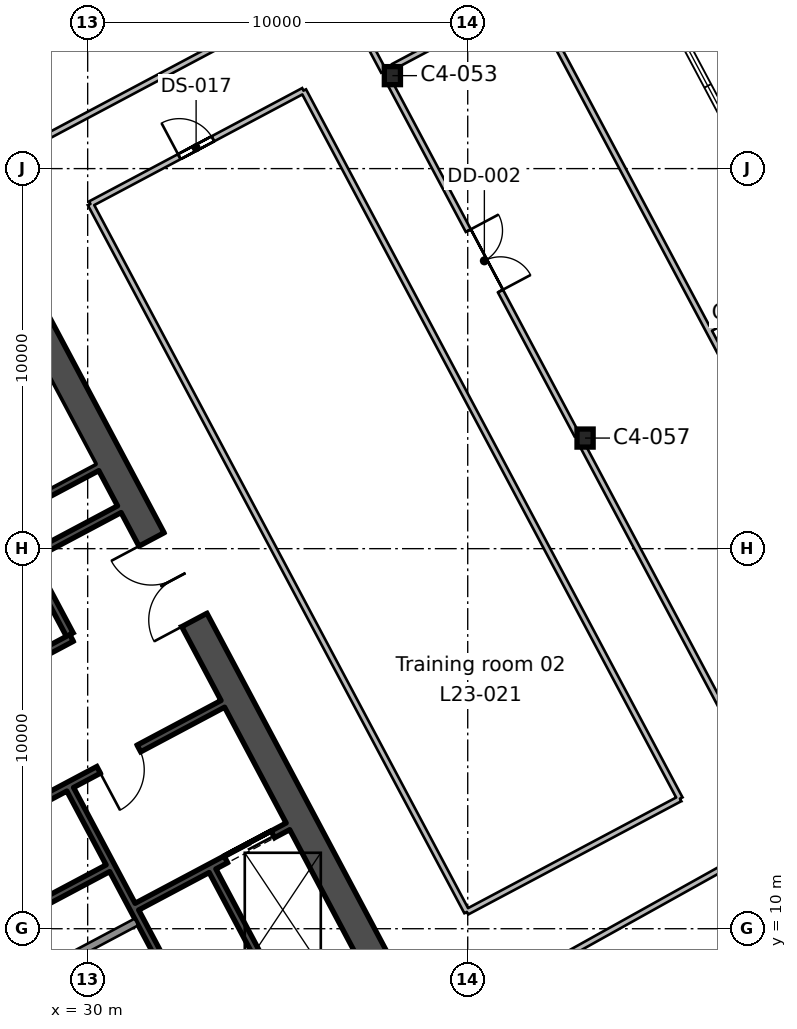
"""IFC4 building model, lengths in metres.
Left out: names, types, materials, properties, quantities, classifications, styles, units other than length and angle.
Written with IfcOpenShell. Run it as: python <this file> out.ifc"""

import sys

from ifc_helpers import new_model, si_unit, direction, frame, frame_2d, origin, origin_2d, place, context, subcontext, project, spatial, rectangle, i_section, extrude, element, fill, save


model = new_model("IFC4")
c1 = context("Model", 3, precision=1e-05, world=origin(), true_north=direction((0.0, 1.0)))
c2 = subcontext(c1, "Body", "Model", "MODEL_VIEW")
j1 = project(units=[si_unit("LENGTHUNIT", "METRE"), si_unit("PLANEANGLEUNIT", "RADIAN")], contexts=[c1])
p1 = place(None, origin())
s1 = spatial("IfcSite", under=j1, at=p1, CompositionType="ELEMENT")
p2 = place(p1, origin())
s2 = spatial("IfcBuilding", under=s1, at=p2, CompositionType="ELEMENT")
p3 = place(p2, frame((0.0, 0.0, 118.2)))
s3 = spatial("IfcBuildingStorey", under=s2, at=p3, CompositionType="ELEMENT", Elevation=118.2)
for number, where, z_axis, x_axis in (
    (1, (43.088, 22.91, 0.0), (0.0, 0.0, 1.0), (1.0, 0.0, 0.0)),
    (2, (38.018, 32.446, 0.0), (0.0, 0.0, 1.0), (1.0, 0.0, 0.0)),
):
    element("IfcColumn", number, at=place(p3, frame(where, z_axis=z_axis, x_axis=x_axis)), inside=s3, PredefinedType="COLUMN", context=c2, shape_type="SweptSolid", body=[
        extrude(i_section(OverallWidth=0.424, OverallDepth=0.475, WebThickness=0.048, FlangeThickness=0.077, FilletRadius=0.015, at=origin_2d()), origin(), (0.0, 0.0, 1.0), 4.0),
    ])
p4 = place(p3, frame((37.713, 8.896, 0.0), z_axis=(0.0, 0.0, 1.0), x_axis=(-0.469469918705, 0.88294846703, 0.0)))
e3 = element("IfcWall", 3, at=p4, inside=s3, PredefinedType="SHEAR", context=c2, shape_type="SweptSolid", body=[
    extrude(rectangle(XDim=19.7, YDim=0.75, at=frame_2d((9.85, 0.0))), origin(), (0.0, 0.0, 1.0), 4.0),
])
p5 = place(p4, frame((10.45, 0.0, 0.0)))
e4 = element("IfcOpeningElement", 4, at=p5, cuts=e3, PredefinedType="OPENING", context=c2, shape_type="SweptSolid", body=[
    extrude(rectangle(XDim=2.4, YDim=2.4, at=frame_2d((1.2, 1.2))), frame((0.0, 0.385, 0.0), z_axis=(0.0, -1.0, 0.0), x_axis=(1.0, 0.0, 0.0)), (0.0, 0.0, 1.0), 0.77),
])
p6 = place(p3, frame((32.968, 7.223, 0.0), z_axis=(0.0, 0.0, 1.0), x_axis=(-0.469480409012, 0.88294288918, 0.0)))
e5 = element("IfcWall", 5, at=p6, inside=s3, PredefinedType="SHEAR", context=c2, shape_type="SweptSolid", body=[
    extrude(rectangle(XDim=7.3, YDim=0.2, at=frame_2d((3.65, 0.0))), origin(), (0.0, 0.0, 1.0), 4.0),
])
p7 = place(p3, frame((29.528, 17.739, 0.0), z_axis=(0.0, 0.0, 1.0), x_axis=(-0.469401318492, 0.882984938828, 0.0)))
e6 = element("IfcWall", 6, at=p7, inside=s3, PredefinedType="SHEAR", context=c2, shape_type="SweptSolid", body=[
    extrude(rectangle(XDim=2.2, YDim=0.2, at=frame_2d((1.1, 0.0))), origin(), (0.0, 0.0, 1.0), 4.0),
])
p8 = place(p3, frame((34.999, 8.303, 0.0), z_axis=(0.0, 0.0, 1.0), x_axis=(-0.4694665462, 0.882950260207, 0.0)))
e7 = element("IfcWall", 7, at=p8, inside=s3, PredefinedType="SHEAR", context=c2, shape_type="SweptSolid", body=[
    extrude(rectangle(XDim=3.65, YDim=0.2, at=frame_2d((1.825, 0.0))), origin(), (0.0, 0.0, 1.0), 4.0),
])
p9 = place(p3, frame((26.692, 7.737, 0.0), z_axis=(0.0, 0.0, 1.0), x_axis=(0.882953967957, 0.469459572775, 0.0)))
e8 = element("IfcWall", 8, at=p9, inside=s3, PredefinedType="SOLIDWALL", context=c2, shape_type="SweptSolid", body=[
    extrude(rectangle(XDim=5.2, YDim=0.2, at=frame_2d((2.6, 0.0))), origin(), (0.0, 0.0, 1.0), 4.0),
])
p10 = place(p3, frame((31.296, 10.581, 0.0), z_axis=(0.0, 0.0, 1.0), x_axis=(0.882960433586, 0.469447412093, 0.0)))
e9 = element("IfcWall", 9, at=p10, inside=s3, PredefinedType="SHEAR", context=c2, shape_type="SweptSolid", body=[
    extrude(rectangle(XDim=4.5, YDim=0.2, at=frame_2d((2.25, 0.0))), origin(), (0.0, 0.0, 1.0), 4.0),
])
p11 = place(p10, frame((2.65, 0.0, 0.0)))
e10 = element("IfcOpeningElement", 10, at=p11, cuts=e9, PredefinedType="OPENING", context=c2, shape_type="SweptSolid", body=[
    extrude(rectangle(XDim=1.4, YDim=2.4, at=frame_2d((0.7, 1.2))), frame((0.0, 0.11, 0.0), z_axis=(0.0, -1.0, 0.0), x_axis=(1.0, 0.0, 0.0)), (0.0, 0.0, 1.0), 0.22),
])
p12 = place(p3, frame((25.941, 9.15, 0.0), z_axis=(0.0, 0.0, 1.0), x_axis=(0.882953967957, 0.469459572775, 0.0)))
e11 = element("IfcWall", 11, at=p12, inside=s3, PredefinedType="SHEAR", context=c2, shape_type="SweptSolid", body=[
    extrude(rectangle(XDim=5.2, YDim=0.2, at=frame_2d((2.6, 0.0))), origin(), (0.0, 0.0, 1.0), 4.0),
])
p13 = place(p3, frame((24.726, 11.222, 0.0), z_axis=(0.0, 0.0, 1.0), x_axis=(0.882940221191, 0.469485426614, 0.0)))
e12 = element("IfcWall", 12, at=p13, inside=s3, PredefinedType="SHEAR", context=c2, shape_type="SweptSolid", body=[
    extrude(rectangle(XDim=10.0, YDim=0.2, at=frame_2d((5.0, 0.0))), origin(), (0.0, 0.0, 1.0), 4.0),
])
p14 = place(p13, frame((6.3, 0.0, 0.0)))
e13 = element("IfcOpeningElement", 13, at=p14, cuts=e12, PredefinedType="OPENING", context=c2, shape_type="SweptSolid", body=[
    extrude(rectangle(XDim=1.2, YDim=2.1, at=frame_2d((0.6, 1.05))), frame((0.0, 0.11, 0.0), z_axis=(0.0, -1.0, 0.0), x_axis=(1.0, 0.0, 0.0)), (0.0, 0.0, 1.0), 0.22),
])
p15 = place(p13, frame((0.36, 0.0, 0.0)))
e14 = element("IfcOpeningElement", 14, at=p15, cuts=e12, PredefinedType="OPENING", context=c2, shape_type="SweptSolid", body=[
    extrude(rectangle(XDim=0.9, YDim=2.1, at=frame_2d((0.45, 1.05))), frame((0.0, 0.11, 0.0), z_axis=(0.0, -1.0, 0.0), x_axis=(1.0, 0.0, 0.0)), (0.0, 0.0, 1.0), 0.22),
])
p16 = place(p13, frame((3.06, 0.0, 0.0)))
e15 = element("IfcOpeningElement", 15, at=p16, cuts=e12, PredefinedType="OPENING", context=c2, shape_type="SweptSolid", body=[
    extrude(rectangle(XDim=0.9, YDim=2.1, at=frame_2d((0.45, 1.05))), frame((0.0, 0.11, 0.0), z_axis=(0.0, -1.0, 0.0), x_axis=(1.0, 0.0, 0.0)), (0.0, 0.0, 1.0), 0.22),
])
p17 = place(p3, frame((24.807, 15.116, 0.0), z_axis=(0.0, 0.0, 1.0), x_axis=(0.882942972946, 0.469480251476, 0.0)))
e16 = element("IfcWall", 16, at=p17, inside=s3, PredefinedType="SHEAR", context=c2, shape_type="SweptSolid", body=[
    extrude(rectangle(XDim=5.4, YDim=0.2, at=frame_2d((2.7, 0.0))), origin(), (0.0, 0.0, 1.0), 4.0),
])
p18 = place(p17, frame((0.8, 0.0, 0.0)))
e17 = element("IfcOpeningElement", 17, at=p18, cuts=e16, PredefinedType="OPENING", context=c2, shape_type="SweptSolid", body=[
    extrude(rectangle(XDim=1.1, YDim=2.1, at=frame_2d((0.55, 1.05))), frame((0.0, 0.11, 0.0), z_axis=(0.0, -1.0, 0.0), x_axis=(1.0, 0.0, 0.0)), (0.0, 0.0, 1.0), 0.22),
])
p19 = place(p17, frame((3.5, 0.0, 0.0)))
e18 = element("IfcOpeningElement", 18, at=p19, cuts=e16, PredefinedType="OPENING", context=c2, shape_type="SweptSolid", body=[
    extrude(rectangle(XDim=1.1, YDim=2.1, at=frame_2d((0.55, 1.05))), frame((0.0, 0.11, 0.0), z_axis=(0.0, -1.0, 0.0), x_axis=(1.0, 0.0, 0.0)), (0.0, 0.0, 1.0), 0.22),
])
p20 = place(p3, frame((23.769, 17.282, 0.0), z_axis=(0.0, 0.0, 1.0), x_axis=(0.882940221191, 0.469485426614, 0.0)))
e19 = element("IfcWall", 19, at=p20, inside=s3, PredefinedType="SHEAR", context=c2, shape_type="SweptSolid", body=[
    extrude(rectangle(XDim=8.0, YDim=0.2, at=frame_2d((4.0, 0.0))), origin(), (0.0, 0.0, 1.0), 4.0),
])
p21 = place(p3, frame((23.182, 18.385, 0.0), z_axis=(0.0, 0.0, 1.0), x_axis=(0.88295287151, 0.469461634952, 0.0)))
e20 = element("IfcWall", 20, at=p21, inside=s3, PredefinedType="SHEAR", context=c2, shape_type="SweptSolid", body=[
    extrude(rectangle(XDim=8.0, YDim=0.2, at=frame_2d((4.0, 0.0))), origin(), (0.0, 0.0, 1.0), 4.0),
])
p22 = place(p3, frame((15.258, 28.499, 0.0), z_axis=(0.0, 0.0, 1.0), x_axis=(0.882941691772, 0.469482660948, 0.0)))
e21 = element("IfcWall", 21, at=p22, inside=s3, PredefinedType="PARTITIONING", context=c2, shape_type="SweptSolid", body=[
    extrude(rectangle(XDim=23.149, YDim=0.15, at=frame_2d((11.574, 0.0))), origin(), (0.0, 0.0, 1.0), 3.64),
])
p23 = place(p3, frame((37.789, 32.557, 0.0), z_axis=(0.0, 0.0, 1.0), x_axis=(-0.469557862383, 0.882901701139, 0.0)))
e22 = element("IfcWall", 22, at=p23, inside=s3, PredefinedType="PARTITIONING", context=c2, shape_type="SweptSolid", body=[
    extrude(rectangle(XDim=2.645, YDim=0.15, at=frame_2d((1.323, 0.0))), origin(), (0.0, 0.0, 1.0), 3.64),
])
p24 = place(p3, frame((36.547, 34.892, 0.0), z_axis=(0.0, 0.0, 1.0), x_axis=(-0.882949665217, -0.469467665226, 0.0)))
e23 = element("IfcWall", 23, at=p24, inside=s3, PredefinedType="PARTITIONING", context=c2, shape_type="SweptSolid", body=[
    extrude(rectangle(XDim=22.432, YDim=0.15, at=frame_2d((11.216, 0.0))), origin(), (0.0, 0.0, 1.0), 3.64),
])
p25 = place(p24, frame((10.35, 0.0, 0.0)))
e24 = element("IfcOpeningElement", 24, at=p25, cuts=e23, PredefinedType="OPENING", context=c2, shape_type="SweptSolid", body=[
    extrude(rectangle(XDim=1.8, YDim=2.1, at=frame_2d((0.9, 1.05))), frame((0.0, 0.085, 0.0), z_axis=(0.0, -1.0, 0.0), x_axis=(1.0, 0.0, 0.0)), (0.0, 0.0, 1.0), 0.17),
])
p26 = place(p3, frame((46.081, 26.226, 0.0), z_axis=(0.0, 0.0, 1.0), x_axis=(-0.469444635522, 0.882961909812, 0.0)))
e25 = element("IfcWall", 25, at=p26, inside=s3, PredefinedType="PARTITIONING", context=c2, shape_type="SweptSolid", body=[
    extrude(rectangle(XDim=9.477, YDim=0.15, at=frame_2d((4.739, 0.0))), origin(), (0.0, 0.0, 1.0), 3.64),
])
p27 = place(p3, frame((41.632, 34.594, 0.0), z_axis=(0.0, 0.0, 1.0), x_axis=(-0.88295491585, -0.469457789984, 0.0)))
e26 = element("IfcWall", 26, at=p27, inside=s3, PredefinedType="PARTITIONING", context=c2, shape_type="SweptSolid", body=[
    extrude(rectangle(XDim=4.07, YDim=0.15, at=frame_2d((2.035, 0.0))), origin(), (0.0, 0.0, 1.0), 3.64),
])
p28 = place(p3, frame((37.973, 32.209, 0.0), z_axis=(0.0, 0.0, 1.0), x_axis=(0.469526119231, -0.88291858252, 0.0)))
e27 = element("IfcWall", 27, at=p28, inside=s3, PredefinedType="PARTITIONING", context=c2, shape_type="SweptSolid", body=[
    extrude(rectangle(XDim=10.443, YDim=0.15, at=frame_2d((5.221, 0.0))), origin(), (0.0, 0.0, 1.0), 3.64),
])
p29 = place(p28, frame((4.35, 0.0, 0.0)))
e28 = element("IfcOpeningElement", 28, at=p29, cuts=e27, PredefinedType="OPENING", context=c2, shape_type="SweptSolid", body=[
    extrude(rectangle(XDim=1.8, YDim=2.1, at=frame_2d((0.9, 1.05))), frame((0.0, 0.085, 0.0), z_axis=(0.0, -1.0, 0.0), x_axis=(1.0, 0.0, 0.0)), (0.0, 0.0, 1.0), 0.17),
])
p30 = place(p3, frame((43.044, 22.672, 0.0), z_axis=(0.0, 0.0, 1.0), x_axis=(0.469530755038, -0.882916117235, 0.0)))
e29 = element("IfcWall", 29, at=p30, inside=s3, PredefinedType="PARTITIONING", context=c2, shape_type="SweptSolid", body=[
    extrude(rectangle(XDim=10.44, YDim=0.15, at=frame_2d((5.22, 0.0))), origin(), (0.0, 0.0, 1.0), 3.64),
])
p31 = place(p3, frame((48.425, 12.553, 0.0), z_axis=(0.0, 0.0, 1.0), x_axis=(-0.873557655627, -0.486720682009, 0.0)))
e30 = element("IfcWall", 30, at=p31, inside=s3, PredefinedType="PARTITIONING", context=c2, shape_type="SweptSolid", body=[
    extrude(rectangle(XDim=10.633, YDim=0.15, at=frame_2d((5.316, 0.0))), origin(), (0.0, 0.0, 1.0), 3.64),
])
p32 = place(p3, frame((46.081, 26.226, 0.0), z_axis=(0.0, 0.0, 1.0), x_axis=(0.469497962096, -0.88293355559, 0.0)))
e31 = element("IfcWall", 31, at=p32, inside=s3, PredefinedType="PARTITIONING", context=c2, shape_type="SweptSolid", body=[
    extrude(rectangle(XDim=20.032, YDim=0.15, at=frame_2d((10.016, 0.0))), origin(), (0.0, 0.0, 1.0), 3.64),
])
p33 = place(p3, frame((49.152, 27.268, 0.0), z_axis=(0.0, 0.0, 1.0), x_axis=(-0.882819217955, -0.469712921271, 0.0)))
e32 = element("IfcWall", 32, at=p33, inside=s3, PredefinedType="PARTITIONING", context=c2, shape_type="SweptSolid", body=[
    extrude(rectangle(XDim=3.2, YDim=0.15, at=frame_2d((1.6, 0.0))), origin(), (0.0, 0.0, 1.0), 3.64),
])
p34 = place(p3, frame((30.072, 29.071, 0.0), z_axis=(0.0, 0.0, 1.0), x_axis=(0.882967334814, 0.469434431685, 0.0)))
e33 = element("IfcWall", 33, at=p34, inside=s3, PredefinedType="PARTITIONING", context=c2, shape_type="SweptSolid", body=[
    extrude(rectangle(XDim=6.35, YDim=0.15, at=frame_2d((3.175, 0.0))), origin(), (0.0, 0.0, 1.0), 3.64),
])
p35 = place(p34, frame((2.65, 0.0, 0.0)))
e34 = element("IfcOpeningElement", 34, at=p35, cuts=e33, PredefinedType="OPENING", context=c2, shape_type="SweptSolid", body=[
    extrude(rectangle(XDim=1.0, YDim=2.1, at=frame_2d((0.5, 1.05))), frame((0.0, 0.085, 0.0), z_axis=(0.0, -1.0, 0.0), x_axis=(1.0, 0.0, 0.0)), (0.0, 0.0, 1.0), 0.17),
])
p36 = place(p3, frame((35.679, 32.052, 0.0), z_axis=(0.0, 0.0, 1.0), x_axis=(0.469483439962, -0.88294127755, 0.0)))
e35 = element("IfcWall", 35, at=p36, inside=s3, PredefinedType="PARTITIONING", context=c2, shape_type="SweptSolid", body=[
    extrude(rectangle(XDim=21.1, YDim=0.15, at=frame_2d((10.55, 0.0))), origin(), (0.0, 0.0, 1.0), 3.64),
])
p37 = place(p3, frame((45.585, 13.422, 0.0), z_axis=(0.0, 0.0, 1.0), x_axis=(-0.88295139861, -0.469464405139, 0.0)))
e36 = element("IfcWall", 36, at=p37, inside=s3, PredefinedType="PARTITIONING", context=c2, shape_type="SweptSolid", body=[
    extrude(rectangle(XDim=6.35, YDim=0.15, at=frame_2d((3.175, 0.0))), origin(), (0.0, 0.0, 1.0), 3.64),
])
p38 = place(p3, frame((39.978, 10.441, 0.0), z_axis=(0.0, 0.0, 1.0), x_axis=(-0.469478643621, 0.882943827876, 0.0)))
e37 = element("IfcWall", 37, at=p38, inside=s3, PredefinedType="PARTITIONING", context=c2, shape_type="SweptSolid", body=[
    extrude(rectangle(XDim=21.1, YDim=0.15, at=frame_2d((10.55, 0.0))), origin(), (0.0, 0.0, 1.0), 3.64),
])
p39 = place(p5, origin())
e38 = element("IfcDoor", 38, at=p39, inside=s3, OperationType="DOUBLE_DOOR_SINGLE_SWING", PredefinedType="DOOR", context=c2, shape_type="SweptSolid", body=[
    extrude(rectangle(XDim=2.4, YDim=2.4, at=frame_2d((1.2, 1.2))), frame((0.0, 0.025, 0.0), z_axis=(0.0, -1.0, 0.0), x_axis=(1.0, 0.0, 0.0)), (0.0, 0.0, 1.0), 0.05),
])
fill(e4, e38)
p40 = place(p14, frame((1.2, 0.0, 0.0), z_axis=(0.0, 0.0, 1.0), x_axis=(-1.0, 0.0, 0.0)))
e39 = element("IfcDoor", 39, at=p40, inside=s3, OperationType="SINGLE_SWING_RIGHT", PredefinedType="DOOR", context=c2, shape_type="SweptSolid", body=[
    extrude(rectangle(XDim=1.2, YDim=2.1, at=frame_2d((0.6, 1.05))), frame((0.0, 0.025, 0.0), z_axis=(0.0, -1.0, 0.0), x_axis=(1.0, 0.0, 0.0)), (0.0, 0.0, 1.0), 0.05),
])
fill(e13, e39)
p41 = place(p11, origin())
e40 = element("IfcDoor", 40, at=p41, inside=s3, OperationType="DOUBLE_DOOR_SLIDING", PredefinedType="DOOR", context=c2, shape_type="SweptSolid", body=[
    extrude(rectangle(XDim=1.4, YDim=2.4, at=frame_2d((0.7, 1.2))), frame((0.0, 0.025, 0.0), z_axis=(0.0, -1.0, 0.0), x_axis=(1.0, 0.0, 0.0)), (0.0, 0.0, 1.0), 0.05),
])
fill(e10, e40)
p42 = place(p29, origin())
e41 = element("IfcDoor", 41, at=p42, inside=s3, OperationType="DOUBLE_DOOR_SINGLE_SWING", PredefinedType="DOOR", context=c2, shape_type="SweptSolid", body=[
    extrude(rectangle(XDim=1.8, YDim=2.1, at=frame_2d((0.9, 1.05))), frame((0.0, 0.025, 0.0), z_axis=(0.0, -1.0, 0.0), x_axis=(1.0, 0.0, 0.0)), (0.0, 0.0, 1.0), 0.05),
])
fill(e28, e41)
p43 = place(p35, origin())
e42 = element("IfcDoor", 42, at=p43, inside=s3, OperationType="SINGLE_SWING_LEFT", PredefinedType="DOOR", context=c2, shape_type="SweptSolid", body=[
    extrude(rectangle(XDim=1.0, YDim=2.1, at=frame_2d((0.5, 1.05))), frame((0.0, 0.025, 0.0), z_axis=(0.0, -1.0, 0.0), x_axis=(1.0, 0.0, 0.0)), (0.0, 0.0, 1.0), 0.05),
])
fill(e34, e42)
save(model, sys.argv[1])
